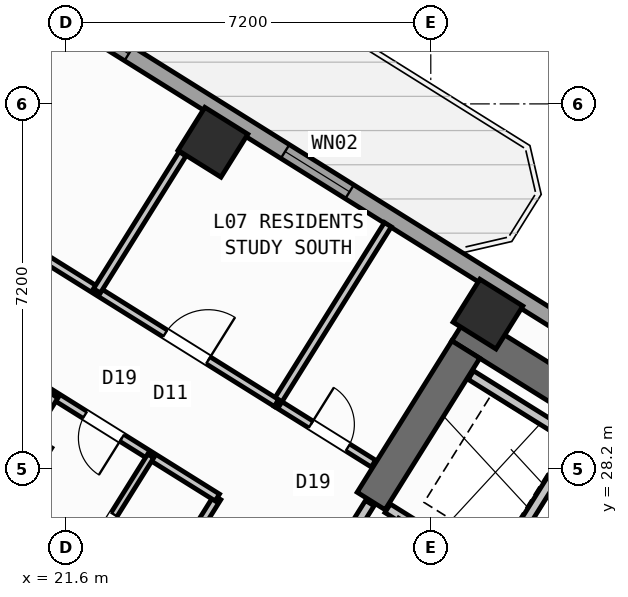
"""IFC4 building model, lengths in metres.
Left out: names, types, materials, properties, quantities, classifications, styles, units other than length and angle.
Written with IfcOpenShell. Run it as: python <this file> out.ifc"""

import sys

from ifc_helpers import new_model, si_unit, direction, frame, frame_2d, origin, origin_2d, place, context, subcontext, project, spatial, rectangle, hollow_rectangle, extrude, source, transform, mapped, element, fill, save


model = new_model("IFC4")
c1 = context("Model", 3, precision=1e-05, world=origin(), true_north=direction((0.0, 1.0)))
c2 = subcontext(c1, "Body", "Model", "MODEL_VIEW")
j1 = project(units=[si_unit("LENGTHUNIT", "METRE"), si_unit("PLANEANGLEUNIT", "RADIAN")], contexts=[c1])
p1 = place(None, origin())
s1 = spatial("IfcSite", under=j1, at=p1, CompositionType="ELEMENT")
p2 = place(p1, origin())
s2 = spatial("IfcBuilding", under=s1, at=p2, CompositionType="ELEMENT")
p3 = place(p2, frame((0.0, 0.0, 31.2)))
s3 = spatial("IfcBuildingStorey", under=s2, at=p3, CompositionType="ELEMENT", Elevation=31.2)
p4 = place(p3, frame((40.615, 23.983, 0.0), z_axis=(0.0, 0.0, 1.0), x_axis=(-0.848045953968, 0.529922692436, 0.0)))
e1 = element("IfcWall", 1, at=p4, inside=s3, PredefinedType="SHEAR", context=c2, shape_type="SweptSolid", body=[
    extrude(rectangle(XDim=13.24, YDim=0.65, at=frame_2d((6.62, 0.0))), origin(), (0.0, 0.0, 1.0), 3.35),
])
p5 = place(p3, frame((29.491, 30.552, 0.0), z_axis=(0.0, 0.0, 1.0), x_axis=(-0.529893103397, -0.8480644427, 0.0)))
e2 = element("IfcWall", 2, at=p5, inside=s3, PredefinedType="SHEAR", context=c2, shape_type="SweptSolid", body=[
    extrude(rectangle(XDim=3.525, YDim=0.65, at=frame_2d((1.763, 0.0))), origin(), (0.0, 0.0, 1.0), 3.35),
])
m1 = source(origin(), c2, "Body", "SweptSolid", [
    extrude(hollow_rectangle(XDim=1.0, YDim=1.0, WallThickness=0.04, at=origin_2d()), origin(), (0.0, 0.0, 1.0), 3.6),
])
for number, where, z_axis, x_axis in (
    (3, (29.928, 31.251, 0.0), (0.0, 0.0, 1.0), (-0.848, 0.53, 0.0)),
    (4, (24.5, 34.643, 0.0), (0.0, 0.0, 1.0), (-0.848, 0.53, 0.0)),
):
    element("IfcColumn", number, at=place(p3, frame(where, z_axis=z_axis, x_axis=x_axis)), inside=s3, PredefinedType="COLUMN", context=c2, shape_type="MappedRepresentation", body=[
        mapped(m1, transform((0.0, 0.0, 0.0), scale=1.0)),
    ])
p6 = place(p3, frame((14.138, 41.825, 0.0), z_axis=(0.0, 0.0, 1.0), x_axis=(0.848046498049, -0.529921821731, 0.0)))
e5 = element("IfcWall", 5, at=p6, inside=s3, PredefinedType="STANDARD", context=c2, shape_type="SweptSolid", body=[
    extrude(rectangle(XDim=31.588, YDim=0.32, at=frame_2d((15.794, 0.0))), origin(), (0.0, 0.0, 1.0), 3.35),
])
p7 = place(p6, frame((3.369, 0.0, 0.0)))
e6 = element("IfcOpeningElement", 6, at=p7, cuts=e5, PredefinedType="OPENING", context=c2, shape_type="SweptSolid", body=[
    extrude(rectangle(XDim=1.05, YDim=2.15, at=frame_2d((0.525, 1.075))), frame((0.0, 0.17, 0.0), z_axis=(0.0, -1.0, 0.0), x_axis=(1.0, 0.0, 0.0)), (0.0, 0.0, 1.0), 0.34),
])
p8 = place(p6, frame((0.946, 0.0, 0.85)))
e7 = element("IfcOpeningElement", 7, at=p8, cuts=e5, PredefinedType="OPENING", context=c2, shape_type="SweptSolid", body=[
    extrude(rectangle(XDim=1.8, YDim=1.5, at=frame_2d((0.9, 0.75))), frame((0.0, 0.17, 0.0), z_axis=(0.0, -1.0, 0.0), x_axis=(1.0, 0.0, 0.0)), (0.0, 0.0, 1.0), 0.34),
])
p9 = place(p6, frame((8.46, 0.0, 0.85)))
e8 = element("IfcOpeningElement", 8, at=p9, cuts=e5, PredefinedType="OPENING", context=c2, shape_type="SweptSolid", body=[
    extrude(rectangle(XDim=1.8, YDim=1.5, at=frame_2d((0.9, 0.75))), frame((0.0, 0.17, 0.0), z_axis=(0.0, -1.0, 0.0), x_axis=(1.0, 0.0, 0.0)), (0.0, 0.0, 1.0), 0.34),
])
p10 = place(p6, frame((13.899, 0.0, 0.85)))
e9 = element("IfcOpeningElement", 9, at=p10, cuts=e5, PredefinedType="OPENING", context=c2, shape_type="SweptSolid", body=[
    extrude(rectangle(XDim=1.5, YDim=1.5, at=frame_2d((0.75, 0.75))), frame((0.0, 0.17, 0.0), z_axis=(0.0, -1.0, 0.0), x_axis=(1.0, 0.0, 0.0)), (0.0, 0.0, 1.0), 0.34),
])
p11 = place(p6, frame((22.019, 0.0, 0.95)))
e10 = element("IfcOpeningElement", 10, at=p11, cuts=e5, PredefinedType="OPENING", context=c2, shape_type="SweptSolid", body=[
    extrude(rectangle(XDim=1.2, YDim=1.4, at=frame_2d((0.6, 0.7))), frame((0.0, 0.17, 0.0), z_axis=(0.0, -1.0, 0.0), x_axis=(1.0, 0.0, 0.0)), (0.0, 0.0, 1.0), 0.34),
])
p12 = place(p6, frame((27.569, 0.0, 0.95)))
e11 = element("IfcOpeningElement", 11, at=p12, cuts=e5, PredefinedType="OPENING", context=c2, shape_type="SweptSolid", body=[
    extrude(rectangle(XDim=1.2, YDim=1.4, at=frame_2d((0.6, 0.7))), frame((0.0, 0.17, 0.0), z_axis=(0.0, -1.0, 0.0), x_axis=(1.0, 0.0, 0.0)), (0.0, 0.0, 1.0), 0.34),
])
p13 = place(p3, frame((31.822, 24.998, 0.0), z_axis=(0.0, 0.0, 1.0), x_axis=(-0.848058348634, 0.529902856485, 0.0)))
e12 = element("IfcWall", 12, at=p13, inside=s3, PredefinedType="STANDARD", context=c2, shape_type="SweptSolid", body=[
    extrude(rectangle(XDim=4.568, YDim=0.2, at=frame_2d((2.284, 0.0))), origin(), (0.0, 0.0, 1.0), 3.34),
])
p14 = place(p3, frame((31.645, 28.716, 0.0), z_axis=(0.0, 0.0, 1.0), x_axis=(-0.52986693015, -0.848080795876, 0.0)))
e13 = element("IfcWall", 13, at=p14, inside=s3, PredefinedType="STANDARD", context=c2, shape_type="SweptSolid", body=[
    extrude(rectangle(XDim=2.66, YDim=0.2, at=frame_2d((1.33, 0.0))), origin(), (0.0, 0.0, 1.0), 3.34),
])
p15 = place(p3, frame((33.363, 27.69, 0.0), z_axis=(0.0, 0.0, 1.0), x_axis=(-0.848053806312, 0.529910125964, 0.0)))
e14 = element("IfcWall", 14, at=p15, inside=s3, PredefinedType="STANDARD", context=c2, shape_type="SweptSolid", body=[
    extrude(rectangle(XDim=4.448, YDim=0.2, at=frame_2d((2.224, 0.0))), origin(), (0.0, 0.0, 1.0), 3.34),
])
p16 = place(p3, frame((27.596, 27.52, 0.0), z_axis=(0.0, 0.0, 1.0), x_axis=(-0.529865479138, -0.848081702443, 0.0)))
e15 = element("IfcWall", 15, at=p16, inside=s3, PredefinedType="STANDARD", context=c2, shape_type="SweptSolid", body=[
    extrude(rectangle(XDim=2.96, YDim=0.2, at=frame_2d((1.48, 0.0))), origin(), (0.0, 0.0, 1.0), 3.34),
])
p17 = place(p16, frame((1.76, 0.0, 0.0)))
e16 = element("IfcOpeningElement", 16, at=p17, cuts=e15, PredefinedType="OPENING", context=c2, shape_type="SweptSolid", body=[
    extrude(rectangle(XDim=0.86, YDim=2.05, at=frame_2d((0.43, 1.025))), frame((0.0, 0.11, 0.0), z_axis=(0.0, -1.0, 0.0), x_axis=(1.0, 0.0, 0.0)), (0.0, 0.0, 1.0), 0.22),
])
p18 = place(p3, frame((27.669, 28.3, 0.0), z_axis=(0.0, 0.0, 1.0), x_axis=(-0.848040823168, 0.52993090327, 0.0)))
e17 = element("IfcWall", 17, at=p18, inside=s3, PredefinedType="PARTITIONING", context=c2, shape_type="SweptSolid", body=[
    extrude(rectangle(XDim=2.258, YDim=0.16, at=frame_2d((1.129, 0.0))), origin(), (0.0, 0.0, 1.0), 3.34),
])
p19 = place(p18, frame((0.598, 0.0, 0.0)))
e18 = element("IfcOpeningElement", 18, at=p19, cuts=e17, PredefinedType="OPENING", context=c2, shape_type="SweptSolid", body=[
    extrude(rectangle(XDim=0.86, YDim=2.05, at=frame_2d((0.43, 1.025))), frame((0.0, 0.09, 0.0), z_axis=(0.0, -1.0, 0.0), x_axis=(1.0, 0.0, 0.0)), (0.0, 0.0, 1.0), 0.18),
])
p20 = place(p3, frame((27.953, 33.016, 0.0), z_axis=(0.0, 0.0, 1.0), x_axis=(-0.529872022255, -0.848077614391, 0.0)))
e19 = element("IfcWall", 19, at=p20, inside=s3, PredefinedType="PARTITIONING", context=c2, shape_type="SweptSolid", body=[
    extrude(rectangle(XDim=4.15, YDim=0.16, at=frame_2d((2.075, 0.0))), origin(), (0.0, 0.0, 1.0), 3.34),
])
p21 = place(p3, frame((24.588, 27.631, 0.0), z_axis=(0.0, 0.0, 1.0), x_axis=(-0.529914586043, -0.848051019396, 0.0)))
e20 = element("IfcWall", 20, at=p21, inside=s3, PredefinedType="PARTITIONING", context=c2, shape_type="SweptSolid", body=[
    extrude(rectangle(XDim=15.35, YDim=0.16, at=frame_2d((7.675, 0.0))), origin(), (0.0, 0.0, 1.0), 3.34),
])
p22 = place(p3, frame((25.754, 29.497, 0.0), z_axis=(0.0, 0.0, 1.0), x_axis=(-0.848045850158, 0.529922858565, 0.0)))
e21 = element("IfcWall", 21, at=p22, inside=s3, PredefinedType="PARTITIONING", context=c2, shape_type="SweptSolid", body=[
    extrude(rectangle(XDim=16.73, YDim=0.16, at=frame_2d((8.365, 0.0))), origin(), (0.0, 0.0, 1.0), 3.34),
])
p23 = place(p22, frame((1.588, 0.0, 0.0)))
e22 = element("IfcOpeningElement", 22, at=p23, cuts=e21, PredefinedType="OPENING", context=c2, shape_type="SweptSolid", body=[
    extrude(rectangle(XDim=1.0, YDim=2.1, at=frame_2d((0.5, 1.05))), frame((0.0, 0.09, 0.0), z_axis=(0.0, -1.0, 0.0), x_axis=(1.0, 0.0, 0.0)), (0.0, 0.0, 1.0), 0.18),
])
p24 = place(p22, frame((6.685, 0.0, 0.0)))
e23 = element("IfcOpeningElement", 23, at=p24, cuts=e21, PredefinedType="OPENING", context=c2, shape_type="SweptSolid", body=[
    extrude(rectangle(XDim=1.0, YDim=2.1, at=frame_2d((0.5, 1.05))), frame((0.0, 0.09, 0.0), z_axis=(0.0, -1.0, 0.0), x_axis=(1.0, 0.0, 0.0)), (0.0, 0.0, 1.0), 0.18),
])
p25 = place(p22, frame((12.951, 0.0, 0.0)))
e24 = element("IfcOpeningElement", 24, at=p25, cuts=e21, PredefinedType="OPENING", context=c2, shape_type="SweptSolid", body=[
    extrude(rectangle(XDim=1.0, YDim=2.1, at=frame_2d((0.5, 1.05))), frame((0.0, 0.09, 0.0), z_axis=(0.0, -1.0, 0.0), x_axis=(1.0, 0.0, 0.0)), (0.0, 0.0, 1.0), 0.18),
])
p26 = place(p3, frame((24.588, 27.631, 0.0), z_axis=(0.0, 0.0, 1.0), x_axis=(-0.848041752158, 0.529929416617, 0.0)))
e25 = element("IfcWall", 25, at=p26, inside=s3, PredefinedType="PARTITIONING", context=c2, shape_type="SweptSolid", body=[
    extrude(rectangle(XDim=16.73, YDim=0.16, at=frame_2d((8.365, 0.0))), origin(), (0.0, 0.0, 1.0), 3.34),
])
p27 = place(p26, frame((2.22, 0.0, 0.0)))
e26 = element("IfcOpeningElement", 26, at=p27, cuts=e25, PredefinedType="OPENING", context=c2, shape_type="SweptSolid", body=[
    extrude(rectangle(XDim=0.86, YDim=2.05, at=frame_2d((0.43, 1.025))), frame((0.0, 0.09, 0.0), z_axis=(0.0, -1.0, 0.0), x_axis=(1.0, 0.0, 0.0)), (0.0, 0.0, 1.0), 0.18),
])
p28 = place(p26, frame((14.22, 0.0, 0.0)))
e27 = element("IfcOpeningElement", 27, at=p28, cuts=e25, PredefinedType="OPENING", context=c2, shape_type="SweptSolid", body=[
    extrude(rectangle(XDim=1.0, YDim=2.1, at=frame_2d((0.5, 1.05))), frame((0.0, 0.09, 0.0), z_axis=(0.0, -1.0, 0.0), x_axis=(1.0, 0.0, 0.0)), (0.0, 0.0, 1.0), 0.18),
])
p29 = place(p3, frame((21.374, 29.639, 0.0), z_axis=(0.0, 0.0, 1.0), x_axis=(-0.529974231203, -0.848013746505, 0.0)))
e28 = element("IfcWall", 28, at=p29, inside=s3, PredefinedType="PARTITIONING", context=c2, shape_type="SweptSolid", body=[
    extrude(rectangle(XDim=0.888, YDim=0.16, at=frame_2d((0.444, 0.0))), origin(), (0.0, 0.0, 1.0), 2.725),
])
p30 = place(p3, frame((23.273, 28.452, 0.0), z_axis=(0.0, 0.0, 1.0), x_axis=(-0.529867639402, -0.848080352747, 0.0)))
e29 = element("IfcWall", 29, at=p30, inside=s3, PredefinedType="PLUMBINGWALL", context=c2, shape_type="SweptSolid", body=[
    extrude(rectangle(XDim=3.51, YDim=0.14, at=frame_2d((1.755, 0.0))), origin(), (0.0, 0.0, 1.0), 2.995),
])
p31 = place(p30, frame((1.365, 0.0, 0.0)))
e30 = element("IfcOpeningElement", 30, at=p31, cuts=e29, PredefinedType="OPENING", context=c2, shape_type="SweptSolid", body=[
    extrude(rectangle(XDim=0.78, YDim=2.05, at=frame_2d((0.39, 1.025))), frame((0.0, 0.08, 0.0), z_axis=(0.0, -1.0, 0.0), x_axis=(1.0, 0.0, 0.0)), (0.0, 0.0, 1.0), 0.16),
])
p32 = place(p3, frame((23.901, 34.414, 0.0), z_axis=(0.0, 0.0, 1.0), x_axis=(-0.529930102756, -0.848041323399, 0.0)))
e31 = element("IfcWall", 31, at=p32, inside=s3, PredefinedType="PARTITIONING", context=c2, shape_type="SweptSolid", body=[
    extrude(rectangle(XDim=3.188, YDim=0.16, at=frame_2d((1.594, 0.0))), origin(), (0.0, 0.0, 1.0), 3.34),
])
m2 = source(origin(), c2, "Body", "SweptSolid", [
    extrude(rectangle(XDim=1.8, YDim=1.5, at=frame_2d((0.9, 0.75))), frame((0.0, 0.03, 0.0), z_axis=(0.0, -1.0, 0.0), x_axis=(1.0, 0.0, 0.0)), (0.0, 0.0, 1.0), 0.06),
])
p33 = place(p9, origin())
e32 = element("IfcWindow", 32, at=p33, inside=s3, PartitioningType="SINGLE_PANEL", PredefinedType="WINDOW", context=c2, shape_type="MappedRepresentation", body=[
    mapped(m2, transform((0.0, 0.0, 0.0), scale=1.0)),
])
fill(e8, e32)
m3 = source(origin(), c2, "Body", "SweptSolid", [
    extrude(rectangle(XDim=1.5, YDim=1.5, at=frame_2d((0.75, 0.75))), frame((0.0, 0.03, 0.0), z_axis=(0.0, -1.0, 0.0), x_axis=(1.0, 0.0, 0.0)), (0.0, 0.0, 1.0), 0.06),
])
p34 = place(p10, origin())
e33 = element("IfcWindow", 33, at=p34, inside=s3, PartitioningType="SINGLE_PANEL", PredefinedType="WINDOW", context=c2, shape_type="MappedRepresentation", body=[
    mapped(m3, transform((0.0, 0.0, 0.0), scale=1.0)),
])
fill(e9, e33)
m4 = source(origin(), c2, "Body", "SweptSolid", [
    extrude(rectangle(XDim=0.86, YDim=2.05, at=frame_2d((0.43, 1.025))), frame((0.0, 0.025, 0.0), z_axis=(0.0, -1.0, 0.0), x_axis=(1.0, 0.0, 0.0)), (0.0, 0.0, 1.0), 0.05),
])
p35 = place(p19, frame((0.86, 0.0, 0.0), z_axis=(0.0, 0.0, 1.0), x_axis=(-1.0, 0.0, 0.0)))
e34 = element("IfcDoor", 34, at=p35, inside=s3, OperationType="SINGLE_SWING_LEFT", PredefinedType="DOOR", context=c2, shape_type="MappedRepresentation", body=[
    mapped(m4, transform((0.0, 0.0, 0.0), scale=1.0)),
])
fill(e18, e34)
p36 = place(p27, origin())
e35 = element("IfcDoor", 35, at=p36, inside=s3, OperationType="SINGLE_SWING_LEFT", PredefinedType="DOOR", context=c2, shape_type="MappedRepresentation", body=[
    mapped(m4, transform((0.0, 0.0, 0.0), scale=1.0)),
])
fill(e26, e35)
m5 = source(origin(), c2, "Body", "SweptSolid", [
    extrude(rectangle(XDim=0.78, YDim=2.05, at=frame_2d((0.39, 1.025))), frame((0.0, 0.025, 0.0), z_axis=(0.0, -1.0, 0.0), x_axis=(1.0, 0.0, 0.0)), (0.0, 0.0, 1.0), 0.05),
])
p37 = place(p31, origin())
e36 = element("IfcDoor", 36, at=p37, inside=s3, OperationType="SINGLE_SWING_RIGHT", PredefinedType="DOOR", context=c2, shape_type="MappedRepresentation", body=[
    mapped(m5, transform((0.0, 0.0, 0.0), scale=1.0)),
])
fill(e30, e36)
m6 = source(origin(), c2, "Body", "SweptSolid", [
    extrude(rectangle(XDim=1.0, YDim=2.1, at=frame_2d((0.5, 1.05))), frame((0.0, 0.025, 0.0), z_axis=(0.0, -1.0, 0.0), x_axis=(1.0, 0.0, 0.0)), (0.0, 0.0, 1.0), 0.05),
])
p38 = place(p23, frame((1.0, 0.0, 0.0), z_axis=(0.0, 0.0, 1.0), x_axis=(-1.0, 0.0, 0.0)))
e37 = element("IfcDoor", 37, at=p38, inside=s3, OperationType="SINGLE_SWING_RIGHT", PredefinedType="DOOR", context=c2, shape_type="MappedRepresentation", body=[
    mapped(m6, transform((0.0, 0.0, 0.0), scale=1.0)),
])
fill(e22, e37)
save(model, sys.argv[1])
